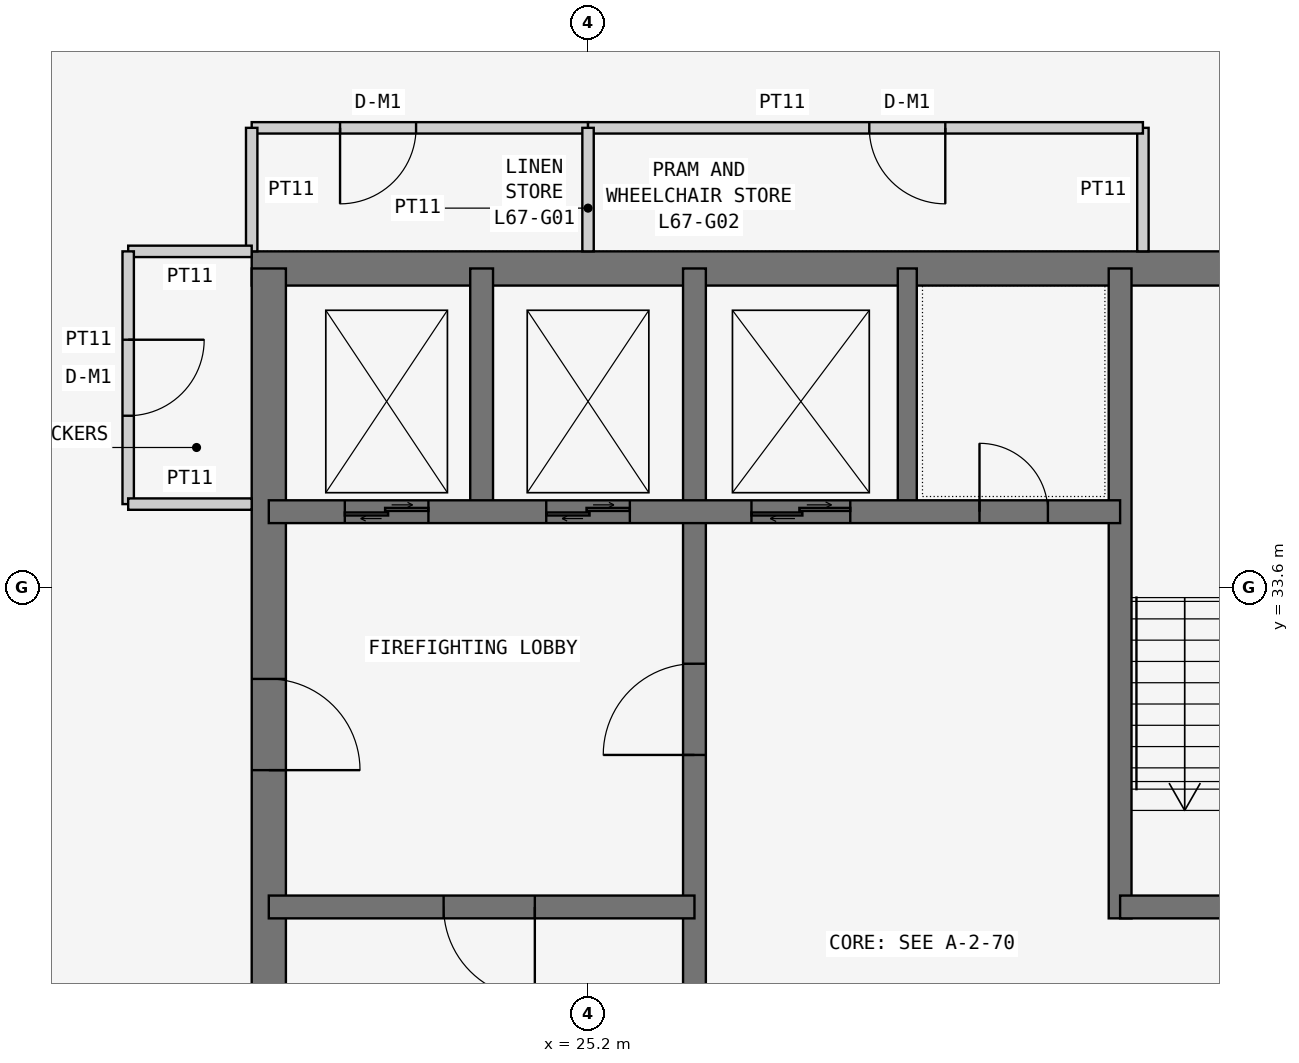
"""IFC4 building model, lengths in metres.
Left out: names, types, materials, properties, quantities, classifications, styles, units other than length and angle.
Written with IfcOpenShell. Run it as: python <this file> out.ifc"""

import sys

from ifc_helpers import new_model, si_unit, direction, frame, frame_2d, origin, place, context, subcontext, project, spatial, rectangle, extrude, element, fill, save


model = new_model("IFC4")
c1 = context("Model", 3, precision=1e-05, world=origin(), true_north=direction((0.0, 1.0)))
c2 = subcontext(c1, "Body", "Model", "MODEL_VIEW")
j1 = project(units=[si_unit("LENGTHUNIT", "METRE"), si_unit("PLANEANGLEUNIT", "RADIAN")], contexts=[c1])
p1 = place(None, origin())
s1 = spatial("IfcSite", under=j1, at=p1, CompositionType="ELEMENT")
p2 = place(p1, origin())
s2 = spatial("IfcBuilding", under=s1, at=p2, CompositionType="ELEMENT")
p3 = place(p2, frame((0.0, 0.0, 257.7)))
s3 = spatial("IfcBuildingStorey", under=s2, at=p3, CompositionType="ELEMENT", Elevation=257.7)
p4 = place(p3, frame((37.8, 37.8, 0.0), z_axis=(0.0, 0.0, 1.0), x_axis=(-1.0, 0.0, 0.0)))
e1 = element("IfcWall", 1, at=p4, inside=s3, PredefinedType="SHEAR", context=c2, shape_type="SweptSolid", body=[
    extrude(rectangle(XDim=17.025, YDim=0.45, at=frame_2d((8.513, 0.0))), origin(), (0.0, 0.0, 1.0), 3.6),
])
p5 = place(p3, frame((21.0, 37.8, 0.0), z_axis=(0.0, 0.0, 1.0), x_axis=(0.0, -1.0, 0.0)))
e2 = element("IfcWall", 2, at=p5, inside=s3, PredefinedType="SHEAR", context=c2, shape_type="SweptSolid", body=[
    extrude(rectangle(XDim=17.025, YDim=0.45, at=frame_2d((8.513, 0.0))), origin(), (0.0, 0.0, 1.0), 3.6),
])
p6 = place(p5, frame((5.4, 0.0, 0.0)))
e3 = element("IfcOpeningElement", 3, at=p6, cuts=e2, PredefinedType="OPENING", context=c2, shape_type="SweptSolid", body=[
    extrude(rectangle(XDim=1.2, YDim=2.1, at=frame_2d((0.6, 1.05))), frame((0.0, 0.235, 0.0), z_axis=(0.0, -1.0, 0.0), x_axis=(1.0, 0.0, 0.0)), (0.0, 0.0, 1.0), 0.47),
])
p7 = place(p3, frame((26.6, 21.0, 0.0), z_axis=(0.0, 0.0, 1.0), x_axis=(0.0, 1.0, 0.0)))
e4 = element("IfcWall", 4, at=p7, inside=s3, PredefinedType="SHEAR", context=c2, shape_type="SweptSolid", body=[
    extrude(rectangle(XDim=16.8, YDim=0.3, at=frame_2d((8.4, 0.0))), origin(), (0.0, 0.0, 1.0), 3.6),
])
p8 = place(p7, frame((10.4, 0.0, 0.0)))
e5 = element("IfcOpeningElement", 5, at=p8, cuts=e4, PredefinedType="OPENING", context=c2, shape_type="SweptSolid", body=[
    extrude(rectangle(XDim=1.2, YDim=2.1, at=frame_2d((0.6, 1.05))), frame((0.0, 0.16, 0.0), z_axis=(0.0, -1.0, 0.0), x_axis=(1.0, 0.0, 0.0)), (0.0, 0.0, 1.0), 0.32),
])
p9 = place(p3, frame((21.0, 29.4, 0.0), z_axis=(0.0, 0.0, 1.0), x_axis=(1.0, 0.0, 0.0)))
e6 = element("IfcWall", 6, at=p9, inside=s3, PredefinedType="SHEAR", context=c2, shape_type="SweptSolid", body=[
    extrude(rectangle(XDim=5.6, YDim=0.3, at=frame_2d((2.8, 0.0))), origin(), (0.0, 0.0, 1.0), 3.6),
])
p10 = place(p9, frame((2.3, 0.0, 0.0)))
e7 = element("IfcOpeningElement", 7, at=p10, cuts=e6, PredefinedType="OPENING", context=c2, shape_type="SweptSolid", body=[
    extrude(rectangle(XDim=1.2, YDim=2.1, at=frame_2d((0.6, 1.05))), frame((0.0, 0.16, 0.0), z_axis=(0.0, -1.0, 0.0), x_axis=(1.0, 0.0, 0.0)), (0.0, 0.0, 1.0), 0.32),
])
p11 = place(p3, frame((21.0, 34.6, 0.0), z_axis=(0.0, 0.0, 1.0), x_axis=(1.0, 0.0, 0.0)))
e8 = element("IfcWall", 8, at=p11, inside=s3, PredefinedType="SHEAR", context=c2, shape_type="SweptSolid", body=[
    extrude(rectangle(XDim=11.2, YDim=0.3, at=frame_2d((5.6, 0.0))), origin(), (0.0, 0.0, 1.0), 3.6),
])
p12 = place(p11, frame((9.35, 0.0, 0.0)))
e9 = element("IfcOpeningElement", 9, at=p12, cuts=e8, PredefinedType="OPENING", context=c2, shape_type="SweptSolid", body=[
    extrude(rectangle(XDim=0.9, YDim=2.1, at=frame_2d((0.45, 1.05))), frame((0.0, 0.16, 0.0), z_axis=(0.0, -1.0, 0.0), x_axis=(1.0, 0.0, 0.0)), (0.0, 0.0, 1.0), 0.32),
])
p13 = place(p11, frame((1.0, 0.0, 0.0)))
e10 = element("IfcOpeningElement", 10, at=p13, cuts=e8, PredefinedType="OPENING", context=c2, shape_type="SweptSolid", body=[
    extrude(rectangle(XDim=1.1, YDim=2.1, at=frame_2d((0.55, 1.05))), frame((0.0, 0.16, 0.0), z_axis=(0.0, -1.0, 0.0), x_axis=(1.0, 0.0, 0.0)), (0.0, 0.0, 1.0), 0.32),
])
p14 = place(p11, frame((3.65, 0.0, 0.0)))
e11 = element("IfcOpeningElement", 11, at=p14, cuts=e8, PredefinedType="OPENING", context=c2, shape_type="SweptSolid", body=[
    extrude(rectangle(XDim=1.1, YDim=2.1, at=frame_2d((0.55, 1.05))), frame((0.0, 0.16, 0.0), z_axis=(0.0, -1.0, 0.0), x_axis=(1.0, 0.0, 0.0)), (0.0, 0.0, 1.0), 0.32),
])
p15 = place(p11, frame((6.35, 0.0, 0.0)))
e12 = element("IfcOpeningElement", 12, at=p15, cuts=e8, PredefinedType="OPENING", context=c2, shape_type="SweptSolid", body=[
    extrude(rectangle(XDim=1.3, YDim=2.1, at=frame_2d((0.65, 1.05))), frame((0.0, 0.16, 0.0), z_axis=(0.0, -1.0, 0.0), x_axis=(1.0, 0.0, 0.0)), (0.0, 0.0, 1.0), 0.32),
])
p16 = place(p3, frame((23.8, 34.6, 0.0), z_axis=(0.0, 0.0, 1.0), x_axis=(0.0, 1.0, 0.0)))
e13 = element("IfcWall", 13, at=p16, inside=s3, PredefinedType="SHEAR", context=c2, shape_type="SweptSolid", body=[
    extrude(rectangle(XDim=3.2, YDim=0.3, at=frame_2d((1.6, 0.0))), origin(), (0.0, 0.0, 1.0), 3.6),
])
p17 = place(p3, frame((32.2, 29.25, 0.0), z_axis=(0.0, 0.0, 1.0), x_axis=(0.0, 1.0, 0.0)))
e14 = element("IfcWall", 14, at=p17, inside=s3, PredefinedType="SHEAR", context=c2, shape_type="SweptSolid", body=[
    extrude(rectangle(XDim=8.55, YDim=0.3, at=frame_2d((4.275, 0.0))), origin(), (0.0, 0.0, 1.0), 3.6),
])
p18 = place(p3, frame((32.2, 29.4, 0.0), z_axis=(0.0, 0.0, 1.0), x_axis=(1.0, 0.0, 0.0)))
e15 = element("IfcWall", 15, at=p18, inside=s3, PredefinedType="SHEAR", context=c2, shape_type="SweptSolid", body=[
    extrude(rectangle(XDim=5.6, YDim=0.3, at=frame_2d((2.8, 0.0))), origin(), (0.0, 0.0, 1.0), 3.6),
])
p19 = place(p18, frame((2.0, 0.0, 0.0)))
e16 = element("IfcOpeningElement", 16, at=p19, cuts=e15, PredefinedType="OPENING", context=c2, shape_type="SweptSolid", body=[
    extrude(rectangle(XDim=1.2, YDim=2.1, at=frame_2d((0.6, 1.05))), frame((0.0, 0.16, 0.0), z_axis=(0.0, -1.0, 0.0), x_axis=(1.0, 0.0, 0.0)), (0.0, 0.0, 1.0), 0.32),
])
p20 = place(p3, frame((29.4, 34.6, 0.0), z_axis=(0.0, 0.0, 1.0), x_axis=(0.0, 1.0, 0.0)))
e17 = element("IfcWall", 17, at=p20, inside=s3, PredefinedType="SHEAR", context=c2, shape_type="SweptSolid", body=[
    extrude(rectangle(XDim=3.2, YDim=0.25, at=frame_2d((1.6, 0.0))), origin(), (0.0, 0.0, 1.0), 3.6),
])
p21 = place(p3, frame((25.2, 39.65, 0.0), z_axis=(0.0, 0.0, 1.0), x_axis=(-1.0, 0.0, 0.0)))
e18 = element("IfcWall", 18, at=p21, inside=s3, PredefinedType="PARTITIONING", context=c2, shape_type="SweptSolid", body=[
    extrude(rectangle(XDim=4.425, YDim=0.15, at=frame_2d((2.212, 0.0))), origin(), (0.0, 0.0, 1.0), 3.45),
])
p22 = place(p21, frame((2.262, 0.0, 0.0)))
e19 = element("IfcOpeningElement", 19, at=p22, cuts=e18, PredefinedType="OPENING", context=c2, shape_type="SweptSolid", body=[
    extrude(rectangle(XDim=1.0, YDim=2.1, at=frame_2d((0.5, 1.05))), frame((0.0, 0.085, 0.0), z_axis=(0.0, -1.0, 0.0), x_axis=(1.0, 0.0, 0.0)), (0.0, 0.0, 1.0), 0.17),
])
for number, where, z_axis, x_axis in (
    (20, (20.775, 39.65, 0.0), (0.0, 0.0, 1.0), (0.0, -1.0, 0.0)),
    (21, (32.5, 38.025, 0.0), (0.0, 0.0, 1.0), (0.0, 1.0, 0.0)),
):
    element("IfcWall", number, at=place(p3, frame(where, z_axis=z_axis, x_axis=x_axis)), inside=s3, PredefinedType="PARTITIONING", context=c2, shape_type="SweptSolid", body=[
        extrude(rectangle(XDim=1.625, YDim=0.15, at=frame_2d((0.812, 0.0))), origin(), (0.0, 0.0, 1.0), 3.45),
    ])
p23 = place(p3, frame((32.5, 39.65, 0.0), z_axis=(0.0, 0.0, 1.0), x_axis=(-1.0, 0.0, 0.0)))
e22 = element("IfcWall", 22, at=p23, inside=s3, PredefinedType="PARTITIONING", context=c2, shape_type="SweptSolid", body=[
    extrude(rectangle(XDim=7.3, YDim=0.15, at=frame_2d((3.65, 0.0))), origin(), (0.0, 0.0, 1.0), 3.45),
])
p24 = place(p23, frame((2.6, 0.0, 0.0)))
e23 = element("IfcOpeningElement", 23, at=p24, cuts=e22, PredefinedType="OPENING", context=c2, shape_type="SweptSolid", body=[
    extrude(rectangle(XDim=1.0, YDim=2.1, at=frame_2d((0.5, 1.05))), frame((0.0, 0.085, 0.0), z_axis=(0.0, -1.0, 0.0), x_axis=(1.0, 0.0, 0.0)), (0.0, 0.0, 1.0), 0.17),
])
p25 = place(p3, frame((20.775, 38.025, 0.0), z_axis=(0.0, 0.0, 1.0), x_axis=(-1.0, 0.0, 0.0)))
e24 = element("IfcWall", 24, at=p25, inside=s3, PredefinedType="PARTITIONING", context=c2, shape_type="SweptSolid", body=[
    extrude(rectangle(XDim=1.625, YDim=0.15, at=frame_2d((0.812, 0.0))), origin(), (0.0, 0.0, 1.0), 3.45),
])
p26 = place(p3, frame((19.15, 38.025, 0.0), z_axis=(0.0, 0.0, 1.0), x_axis=(0.0, -1.0, 0.0)))
e25 = element("IfcWall", 25, at=p26, inside=s3, PredefinedType="PARTITIONING", context=c2, shape_type="SweptSolid", body=[
    extrude(rectangle(XDim=3.325, YDim=0.15, at=frame_2d((1.663, 0.0))), origin(), (0.0, 0.0, 1.0), 3.45),
])
p27 = place(p26, frame((1.163, 0.0, 0.0)))
e26 = element("IfcOpeningElement", 26, at=p27, cuts=e25, PredefinedType="OPENING", context=c2, shape_type="SweptSolid", body=[
    extrude(rectangle(XDim=1.0, YDim=2.1, at=frame_2d((0.5, 1.05))), frame((0.0, 0.085, 0.0), z_axis=(0.0, -1.0, 0.0), x_axis=(1.0, 0.0, 0.0)), (0.0, 0.0, 1.0), 0.17),
])
p28 = place(p3, frame((19.15, 34.7, 0.0), z_axis=(0.0, 0.0, 1.0), x_axis=(1.0, 0.0, 0.0)))
e27 = element("IfcWall", 27, at=p28, inside=s3, PredefinedType="PARTITIONING", context=c2, shape_type="SweptSolid", body=[
    extrude(rectangle(XDim=1.625, YDim=0.15, at=frame_2d((0.812, 0.0))), origin(), (0.0, 0.0, 1.0), 3.45),
])
p29 = place(p3, frame((25.2, 38.025, 0.0), z_axis=(0.0, 0.0, 1.0), x_axis=(0.0, 1.0, 0.0)))
e28 = element("IfcWall", 28, at=p29, inside=s3, PredefinedType="PARTITIONING", context=c2, shape_type="SweptSolid", body=[
    extrude(rectangle(XDim=1.625, YDim=0.15, at=frame_2d((0.812, 0.0))), origin(), (0.0, 0.0, 1.0), 2.767),
])
p30 = place(p22, origin())
e29 = element("IfcDoor", 29, at=p30, inside=s3, OperationType="SINGLE_SWING_RIGHT", PredefinedType="DOOR", context=c2, shape_type="SweptSolid", body=[
    extrude(rectangle(XDim=1.0, YDim=2.1, at=frame_2d((0.5, 1.05))), frame((0.0, 0.025, 0.0), z_axis=(0.0, -1.0, 0.0), x_axis=(1.0, 0.0, 0.0)), (0.0, 0.0, 1.0), 0.05),
])
fill(e19, e29)
p31 = place(p24, origin())
e30 = element("IfcDoor", 30, at=p31, inside=s3, OperationType="SINGLE_SWING_LEFT", PredefinedType="DOOR", context=c2, shape_type="SweptSolid", body=[
    extrude(rectangle(XDim=1.0, YDim=2.1, at=frame_2d((0.5, 1.05))), frame((0.0, 0.025, 0.0), z_axis=(0.0, -1.0, 0.0), x_axis=(1.0, 0.0, 0.0)), (0.0, 0.0, 1.0), 0.05),
])
fill(e23, e30)
p32 = place(p27, origin())
e31 = element("IfcDoor", 31, at=p32, inside=s3, OperationType="SINGLE_SWING_LEFT", PredefinedType="DOOR", context=c2, shape_type="SweptSolid", body=[
    extrude(rectangle(XDim=1.0, YDim=2.1, at=frame_2d((0.5, 1.05))), frame((0.0, 0.025, 0.0), z_axis=(0.0, -1.0, 0.0), x_axis=(1.0, 0.0, 0.0)), (0.0, 0.0, 1.0), 0.05),
])
fill(e26, e31)
p33 = place(p6, origin())
e32 = element("IfcDoor", 32, at=p33, inside=s3, OperationType="SINGLE_SWING_RIGHT", PredefinedType="DOOR", context=c2, shape_type="SweptSolid", body=[
    extrude(rectangle(XDim=1.2, YDim=2.1, at=frame_2d((0.6, 1.05))), frame((0.0, 0.025, 0.0), z_axis=(0.0, -1.0, 0.0), x_axis=(1.0, 0.0, 0.0)), (0.0, 0.0, 1.0), 0.05),
])
fill(e3, e32)
p34 = place(p10, frame((1.2, 0.0, 0.0), z_axis=(0.0, 0.0, 1.0), x_axis=(-1.0, 0.0, 0.0)))
e33 = element("IfcDoor", 33, at=p34, inside=s3, OperationType="SINGLE_SWING_LEFT", PredefinedType="DOOR", context=c2, shape_type="SweptSolid", body=[
    extrude(rectangle(XDim=1.2, YDim=2.1, at=frame_2d((0.6, 1.05))), frame((0.0, 0.025, 0.0), z_axis=(0.0, -1.0, 0.0), x_axis=(1.0, 0.0, 0.0)), (0.0, 0.0, 1.0), 0.05),
])
fill(e7, e33)
p35 = place(p8, origin())
e34 = element("IfcDoor", 34, at=p35, inside=s3, OperationType="SINGLE_SWING_LEFT", PredefinedType="DOOR", context=c2, shape_type="SweptSolid", body=[
    extrude(rectangle(XDim=1.2, YDim=2.1, at=frame_2d((0.6, 1.05))), frame((0.0, 0.025, 0.0), z_axis=(0.0, -1.0, 0.0), x_axis=(1.0, 0.0, 0.0)), (0.0, 0.0, 1.0), 0.05),
])
fill(e5, e34)
p36 = place(p12, origin())
e35 = element("IfcDoor", 35, at=p36, inside=s3, OperationType="SINGLE_SWING_LEFT", PredefinedType="DOOR", context=c2, shape_type="SweptSolid", body=[
    extrude(rectangle(XDim=0.9, YDim=2.1, at=frame_2d((0.45, 1.05))), frame((0.0, 0.025, 0.0), z_axis=(0.0, -1.0, 0.0), x_axis=(1.0, 0.0, 0.0)), (0.0, 0.0, 1.0), 0.05),
])
fill(e9, e35)
p37 = place(p13, origin())
e36 = element("IfcDoor", 36, at=p37, inside=s3, OperationType="DOUBLE_DOOR_SLIDING", PredefinedType="DOOR", context=c2, shape_type="SweptSolid", body=[
    extrude(rectangle(XDim=1.1, YDim=2.1, at=frame_2d((0.55, 1.05))), frame((0.0, 0.025, 0.0), z_axis=(0.0, -1.0, 0.0), x_axis=(1.0, 0.0, 0.0)), (0.0, 0.0, 1.0), 0.05),
])
fill(e10, e36)
p38 = place(p14, origin())
e37 = element("IfcDoor", 37, at=p38, inside=s3, OperationType="DOUBLE_DOOR_SLIDING", PredefinedType="DOOR", context=c2, shape_type="SweptSolid", body=[
    extrude(rectangle(XDim=1.1, YDim=2.1, at=frame_2d((0.55, 1.05))), frame((0.0, 0.025, 0.0), z_axis=(0.0, -1.0, 0.0), x_axis=(1.0, 0.0, 0.0)), (0.0, 0.0, 1.0), 0.05),
])
fill(e11, e37)
p39 = place(p15, origin())
e38 = element("IfcDoor", 38, at=p39, inside=s3, OperationType="DOUBLE_DOOR_SLIDING", PredefinedType="DOOR", context=c2, shape_type="SweptSolid", body=[
    extrude(rectangle(XDim=1.3, YDim=2.1, at=frame_2d((0.65, 1.05))), frame((0.0, 0.025, 0.0), z_axis=(0.0, -1.0, 0.0), x_axis=(1.0, 0.0, 0.0)), (0.0, 0.0, 1.0), 0.05),
])
fill(e12, e38)
save(model, sys.argv[1])
